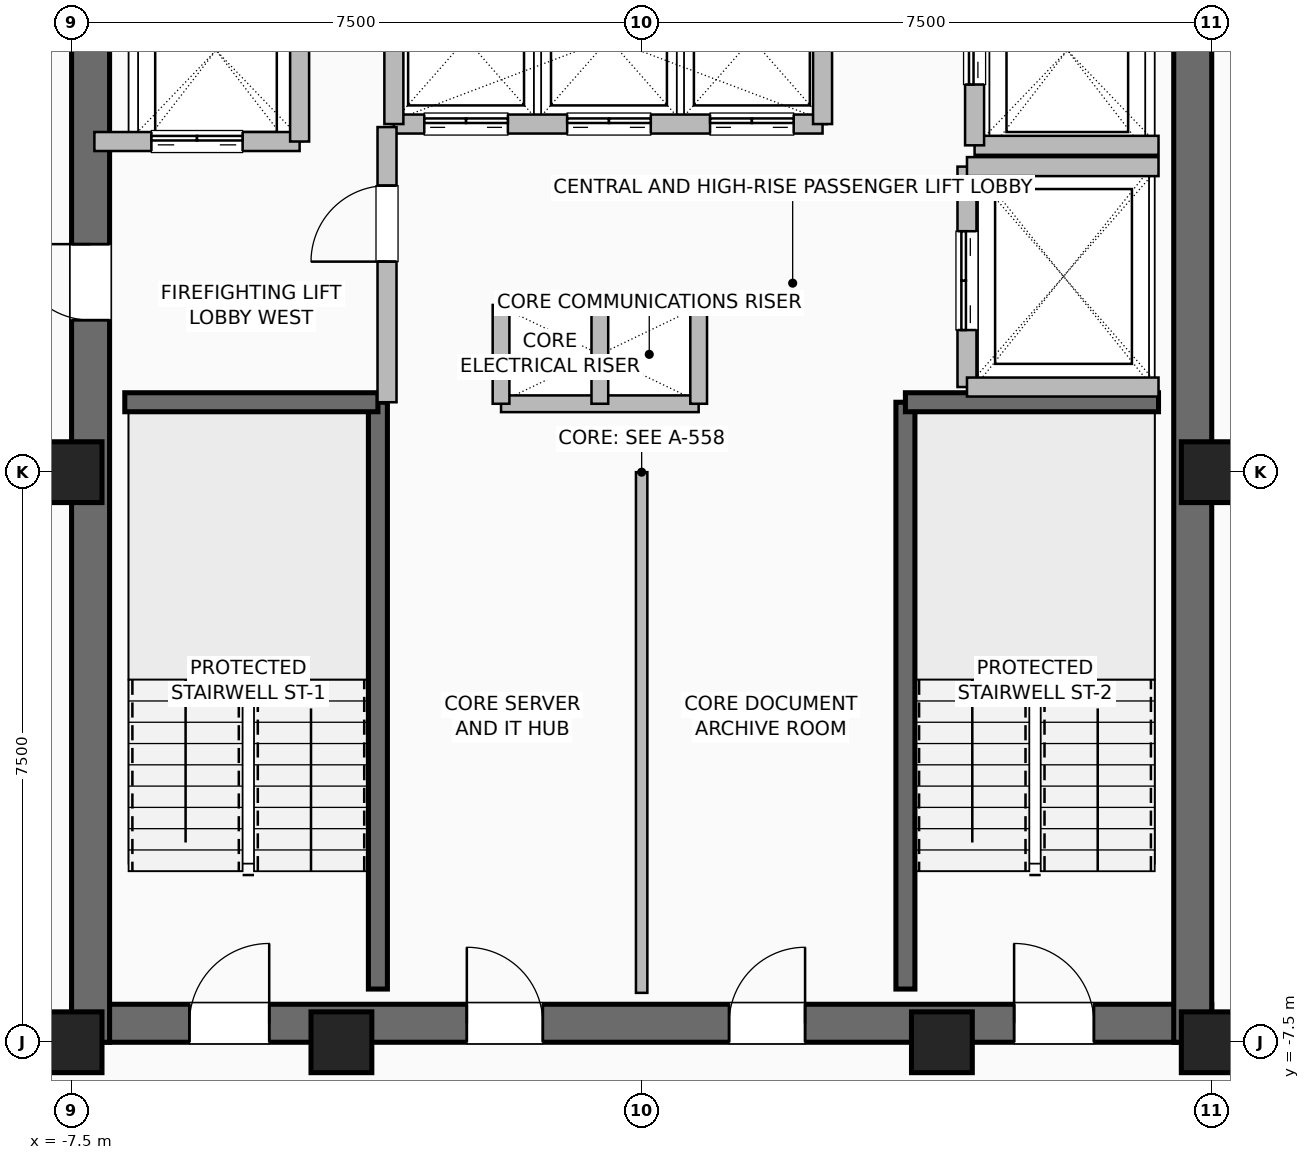
"""IFC4 building model, lengths in metres.
Left out: names, types, materials, properties, quantities, classifications, styles, units other than length and angle.
Written with IfcOpenShell. Run it as: python <this file> out.ifc"""

import sys

from ifc_helpers import new_model, si_unit, direction, frame, frame_2d, origin, origin_2d, place, context, subcontext, project, spatial, rectangle, hollow_rectangle, extrude, element, fill, save


model = new_model("IFC4")
c1 = context("Model", 3, precision=1e-05, world=origin(), true_north=direction((0.0, 1.0)))
c2 = subcontext(c1, "Body", "Model", "MODEL_VIEW")
j1 = project(units=[si_unit("LENGTHUNIT", "METRE"), si_unit("PLANEANGLEUNIT", "RADIAN")], contexts=[c1])
p1 = place(None, origin())
s1 = spatial("IfcSite", under=j1, at=p1, CompositionType="ELEMENT")
p2 = place(p1, origin())
s2 = spatial("IfcBuilding", under=s1, at=p2, CompositionType="ELEMENT")
p3 = place(p2, frame((0.0, 0.0, 232.4)))
s3 = spatial("IfcBuildingStorey", under=s2, at=p3, CompositionType="ELEMENT", Elevation=232.4)
for number, where, z_axis, x_axis in (
    (1, (-7.5, -7.5, 0.0), (0.0, 0.0, 1.0), (1.0, 0.0, 0.0)),
    (2, (-3.95, -7.5, 0.0), (0.0, 0.0, 1.0), (1.0, 0.0, 0.0)),
    (3, (3.95, -7.5, 0.0), (0.0, 0.0, 1.0), (1.0, 0.0, 0.0)),
    (4, (7.5, -7.5, 0.0), (0.0, 0.0, 1.0), (1.0, 0.0, 0.0)),
    (5, (7.5, 0.0, 0.0), (0.0, 0.0, 1.0), (1.0, 0.0, 0.0)),
    (6, (-7.5, 0.0, 0.0), (0.0, 0.0, 1.0), (1.0, 0.0, 0.0)),
):
    element("IfcColumn", number, at=place(p3, frame(where, z_axis=z_axis, x_axis=x_axis)), inside=s3, PredefinedType="COLUMN", context=c2, shape_type="SweptSolid", body=[
        extrude(hollow_rectangle(XDim=0.8, YDim=0.8, WallThickness=0.04, at=origin_2d()), origin(), (0.0, 0.0, 1.0), 3.6),
    ])
p4 = place(p3, frame((-7.5, -7.25, 0.0), z_axis=(0.0, 0.0, 1.0), x_axis=(1.0, 0.0, 0.0)))
e7 = element("IfcWall", 7, at=p4, inside=s3, PredefinedType="SHEAR", context=c2, shape_type="SweptSolid", body=[
    extrude(rectangle(XDim=15.0, YDim=0.5, at=frame_2d((7.5, 0.0))), origin(), (0.0, 0.0, 1.0), 3.36),
])
p5 = place(p4, frame((1.55, 0.0, 0.0)))
e8 = element("IfcOpeningElement", 8, at=p5, cuts=e7, PredefinedType="OPENING", context=c2, shape_type="SweptSolid", body=[
    extrude(rectangle(XDim=1.05, YDim=2.08, at=frame_2d((0.525, 1.04))), frame((0.0, 0.26, 0.0), z_axis=(0.0, -1.0, 0.0), x_axis=(1.0, 0.0, 0.0)), (0.0, 0.0, 1.0), 0.52),
])
p6 = place(p4, frame((12.4, 0.0, 0.0)))
e9 = element("IfcOpeningElement", 9, at=p6, cuts=e7, PredefinedType="OPENING", context=c2, shape_type="SweptSolid", body=[
    extrude(rectangle(XDim=1.05, YDim=2.08, at=frame_2d((0.525, 1.04))), frame((0.0, 0.26, 0.0), z_axis=(0.0, -1.0, 0.0), x_axis=(1.0, 0.0, 0.0)), (0.0, 0.0, 1.0), 0.52),
])
p7 = place(p4, frame((5.2, 0.0, 0.0)))
e10 = element("IfcOpeningElement", 10, at=p7, cuts=e7, PredefinedType="OPENING", context=c2, shape_type="SweptSolid", body=[
    extrude(rectangle(XDim=1.0, YDim=2.08, at=frame_2d((0.5, 1.04))), frame((0.0, 0.26, 0.0), z_axis=(0.0, -1.0, 0.0), x_axis=(1.0, 0.0, 0.0)), (0.0, 0.0, 1.0), 0.52),
])
p8 = place(p4, frame((8.65, 0.0, 0.0)))
e11 = element("IfcOpeningElement", 11, at=p8, cuts=e7, PredefinedType="OPENING", context=c2, shape_type="SweptSolid", body=[
    extrude(rectangle(XDim=1.0, YDim=2.08, at=frame_2d((0.5, 1.04))), frame((0.0, 0.26, 0.0), z_axis=(0.0, -1.0, 0.0), x_axis=(1.0, 0.0, 0.0)), (0.0, 0.0, 1.0), 0.52),
])
p9 = place(p3, frame((-7.25, -7.5, 0.0), z_axis=(0.0, 0.0, 1.0), x_axis=(0.0, 1.0, 0.0)))
e12 = element("IfcWall", 12, at=p9, inside=s3, PredefinedType="SHEAR", context=c2, shape_type="SweptSolid", body=[
    extrude(rectangle(XDim=15.0, YDim=0.5, at=frame_2d((7.5, 0.0))), origin(), (0.0, 0.0, 1.0), 3.36),
])
p10 = place(p9, frame((9.5, 0.0, 0.0)))
e13 = element("IfcOpeningElement", 13, at=p10, cuts=e12, PredefinedType="OPENING", context=c2, shape_type="SweptSolid", body=[
    extrude(rectangle(XDim=1.0, YDim=2.08, at=frame_2d((0.5, 1.04))), frame((0.0, 0.26, 0.0), z_axis=(0.0, -1.0, 0.0), x_axis=(1.0, 0.0, 0.0)), (0.0, 0.0, 1.0), 0.52),
])
p11 = place(p3, frame((7.25, -7.5, 0.0), z_axis=(0.0, 0.0, 1.0), x_axis=(0.0, 1.0, 0.0)))
e14 = element("IfcWall", 14, at=p11, inside=s3, PredefinedType="SHEAR", context=c2, shape_type="SweptSolid", body=[
    extrude(rectangle(XDim=15.0, YDim=0.5, at=frame_2d((7.5, 0.0))), origin(), (0.0, 0.0, 1.0), 3.36),
])
p12 = place(p3, frame((-3.47, -6.8, 0.0), z_axis=(0.0, 0.0, 1.0), x_axis=(0.0, 1.0, 0.0)))
e15 = element("IfcWall", 15, at=p12, inside=s3, PredefinedType="SHEAR", context=c2, shape_type="SweptSolid", body=[
    extrude(rectangle(XDim=7.72, YDim=0.25, at=frame_2d((3.86, 0.0))), origin(), (0.0, 0.0, 1.0), 3.36),
])
p13 = place(p3, frame((-6.8, 0.92, 0.0), z_axis=(0.0, 0.0, 1.0), x_axis=(1.0, 0.0, 0.0)))
e16 = element("IfcWall", 16, at=p13, inside=s3, PredefinedType="SHEAR", context=c2, shape_type="SweptSolid", body=[
    extrude(rectangle(XDim=3.33, YDim=0.25, at=frame_2d((1.665, 0.0))), origin(), (0.0, 0.0, 1.0), 3.36),
])
p14 = place(p3, frame((3.47, -6.8, 0.0), z_axis=(0.0, 0.0, 1.0), x_axis=(0.0, 1.0, 0.0)))
e17 = element("IfcWall", 17, at=p14, inside=s3, PredefinedType="SHEAR", context=c2, shape_type="SweptSolid", body=[
    extrude(rectangle(XDim=7.72, YDim=0.25, at=frame_2d((3.86, 0.0))), origin(), (0.0, 0.0, 1.0), 3.36),
])
p15 = place(p3, frame((3.47, 0.92, 0.0), z_axis=(0.0, 0.0, 1.0), x_axis=(1.0, 0.0, 0.0)))
e18 = element("IfcWall", 18, at=p15, inside=s3, PredefinedType="SHEAR", context=c2, shape_type="SweptSolid", body=[
    extrude(rectangle(XDim=3.33, YDim=0.25, at=frame_2d((1.665, 0.0))), origin(), (0.0, 0.0, 1.0), 3.36),
])
for number, where, z_axis, x_axis in (
    (19, (-1.85, 2.2, 0.0), (0.0, 0.0, 1.0), (1.0, 0.0, 0.0)),
    (20, (-1.85, 0.9, 0.0), (0.0, 0.0, 1.0), (1.0, 0.0, 0.0)),
):
    element("IfcWall", number, at=place(p3, frame(where, z_axis=z_axis, x_axis=x_axis)), inside=s3, PredefinedType="PARTITIONING", context=c2, shape_type="SweptSolid", body=[
        extrude(rectangle(XDim=2.6, YDim=0.22, at=frame_2d((1.3, 0.0))), origin(), (0.0, 0.0, 1.0), 3.36),
    ])
for number, where, z_axis, x_axis in (
    (21, (-0.55, 0.9, 0.0), (0.0, 0.0, 1.0), (0.0, 1.0, 0.0)),
    (22, (0.75, 0.9, 0.0), (0.0, 0.0, 1.0), (0.0, 1.0, 0.0)),
    (23, (-1.85, 0.9, 0.0), (0.0, 0.0, 1.0), (0.0, 1.0, 0.0)),
):
    element("IfcWall", number, at=place(p3, frame(where, z_axis=z_axis, x_axis=x_axis)), inside=s3, PredefinedType="PARTITIONING", context=c2, shape_type="SweptSolid", body=[
        extrude(rectangle(XDim=1.3, YDim=0.22, at=frame_2d((0.65, 0.0))), origin(), (0.0, 0.0, 1.0), 3.36),
    ])
p16 = place(p3, frame((-3.26, 4.58, 0.0), z_axis=(0.0, 0.0, 1.0), x_axis=(1.0, 0.0, 0.0)))
e24 = element("IfcWall", 24, at=p16, inside=s3, PredefinedType="SHEAR", context=c2, shape_type="SweptSolid", body=[
    extrude(rectangle(XDim=5.64, YDim=0.25, at=frame_2d((2.82, 0.0))), origin(), (0.0, 0.0, 1.0), 3.36),
])
p17 = place(p16, frame((0.4, 0.0, 0.0)))
e25 = element("IfcOpeningElement", 25, at=p17, cuts=e24, PredefinedType="OPENING", context=c2, shape_type="SweptSolid", body=[
    extrude(rectangle(XDim=1.1, YDim=2.2, at=frame_2d((0.55, 1.1))), frame((0.0, 0.135, 0.0), z_axis=(0.0, -1.0, 0.0), x_axis=(1.0, 0.0, 0.0)), (0.0, 0.0, 1.0), 0.27),
])
p18 = place(p16, frame((2.28, 0.0, 0.0)))
e26 = element("IfcOpeningElement", 26, at=p18, cuts=e24, PredefinedType="OPENING", context=c2, shape_type="SweptSolid", body=[
    extrude(rectangle(XDim=1.1, YDim=2.2, at=frame_2d((0.55, 1.1))), frame((0.0, 0.135, 0.0), z_axis=(0.0, -1.0, 0.0), x_axis=(1.0, 0.0, 0.0)), (0.0, 0.0, 1.0), 0.27),
])
p19 = place(p16, frame((4.16, 0.0, 0.0)))
e27 = element("IfcOpeningElement", 27, at=p19, cuts=e24, PredefinedType="OPENING", context=c2, shape_type="SweptSolid", body=[
    extrude(rectangle(XDim=1.1, YDim=2.2, at=frame_2d((0.55, 1.1))), frame((0.0, 0.135, 0.0), z_axis=(0.0, -1.0, 0.0), x_axis=(1.0, 0.0, 0.0)), (0.0, 0.0, 1.0), 0.27),
])
for number, where, z_axis, x_axis in (
    (28, (-3.26, 4.58, 0.0), (0.0, 0.0, 1.0), (0.0, 1.0, 0.0)),
    (29, (2.38, 4.58, 0.0), (0.0, 0.0, 1.0), (0.0, 1.0, 0.0)),
):
    element("IfcWall", number, at=place(p3, frame(where, z_axis=z_axis, x_axis=x_axis)), inside=s3, PredefinedType="SHEAR", context=c2, shape_type="SweptSolid", body=[
        extrude(rectangle(XDim=2.22, YDim=0.25, at=frame_2d((1.11, 0.0))), origin(), (0.0, 0.0, 1.0), 3.36),
    ])
p20 = place(p3, frame((-7.2, 4.35, 0.0), z_axis=(0.0, 0.0, 1.0), x_axis=(1.0, 0.0, 0.0)))
e30 = element("IfcWall", 30, at=p20, inside=s3, PredefinedType="SHEAR", context=c2, shape_type="SweptSolid", body=[
    extrude(rectangle(XDim=2.7, YDim=0.25, at=frame_2d((1.35, 0.0))), origin(), (0.0, 0.0, 1.0), 3.36),
])
p21 = place(p20, frame((0.75, 0.0, 0.0)))
e31 = element("IfcOpeningElement", 31, at=p21, cuts=e30, PredefinedType="OPENING", context=c2, shape_type="SweptSolid", body=[
    extrude(rectangle(XDim=1.2, YDim=2.2, at=frame_2d((0.6, 1.1))), frame((0.0, 0.135, 0.0), z_axis=(0.0, -1.0, 0.0), x_axis=(1.0, 0.0, 0.0)), (0.0, 0.0, 1.0), 0.27),
])
p22 = place(p3, frame((-4.5, 4.35, 0.0), z_axis=(0.0, 0.0, 1.0), x_axis=(0.0, 1.0, 0.0)))
e32 = element("IfcWall", 32, at=p22, inside=s3, PredefinedType="SHEAR", context=c2, shape_type="SweptSolid", body=[
    extrude(rectangle(XDim=2.85, YDim=0.25, at=frame_2d((1.425, 0.0))), origin(), (0.0, 0.0, 1.0), 3.36),
])
p23 = place(p3, frame((4.38, 4.3, 0.0), z_axis=(0.0, 0.0, 1.0), x_axis=(1.0, 0.0, 0.0)))
e33 = element("IfcWall", 33, at=p23, inside=s3, PredefinedType="SHEAR", context=c2, shape_type="SweptSolid", body=[
    extrude(rectangle(XDim=2.42, YDim=0.25, at=frame_2d((1.21, 0.0))), origin(), (0.0, 0.0, 1.0), 3.36),
])
p24 = place(p3, frame((4.38, 4.3, 0.0), z_axis=(0.0, 0.0, 1.0), x_axis=(0.0, 1.0, 0.0)))
e34 = element("IfcWall", 34, at=p24, inside=s3, PredefinedType="SHEAR", context=c2, shape_type="SweptSolid", body=[
    extrude(rectangle(XDim=2.5, YDim=0.25, at=frame_2d((1.25, 0.0))), origin(), (0.0, 0.0, 1.0), 3.36),
])
p25 = place(p24, frame((0.8, 0.0, 0.0)))
e35 = element("IfcOpeningElement", 35, at=p25, cuts=e34, PredefinedType="OPENING", context=c2, shape_type="SweptSolid", body=[
    extrude(rectangle(XDim=1.2, YDim=2.2, at=frame_2d((0.6, 1.1))), frame((0.0, 0.135, 0.0), z_axis=(0.0, -1.0, 0.0), x_axis=(1.0, 0.0, 0.0)), (0.0, 0.0, 1.0), 0.27),
])
p26 = place(p3, frame((4.28, 1.12, 0.0), z_axis=(0.0, 0.0, 1.0), x_axis=(0.0, 1.0, 0.0)))
e36 = element("IfcWall", 36, at=p26, inside=s3, PredefinedType="SHEAR", context=c2, shape_type="SweptSolid", body=[
    extrude(rectangle(XDim=2.9, YDim=0.25, at=frame_2d((1.45, 0.0))), origin(), (0.0, 0.0, 1.0), 3.36),
])
p27 = place(p26, frame((0.75, 0.0, 0.0)))
e37 = element("IfcOpeningElement", 37, at=p27, cuts=e36, PredefinedType="OPENING", context=c2, shape_type="SweptSolid", body=[
    extrude(rectangle(XDim=1.3, YDim=2.3, at=frame_2d((0.65, 1.15))), frame((0.0, 0.135, 0.0), z_axis=(0.0, -1.0, 0.0), x_axis=(1.0, 0.0, 0.0)), (0.0, 0.0, 1.0), 0.27),
])
for number, where, z_axis, x_axis in (
    (38, (4.28, 1.12, 0.0), (0.0, 0.0, 1.0), (1.0, 0.0, 0.0)),
    (39, (4.28, 4.02, 0.0), (0.0, 0.0, 1.0), (1.0, 0.0, 0.0)),
):
    element("IfcWall", number, at=place(p3, frame(where, z_axis=z_axis, x_axis=x_axis)), inside=s3, PredefinedType="SHEAR", context=c2, shape_type="SweptSolid", body=[
        extrude(rectangle(XDim=2.52, YDim=0.25, at=frame_2d((1.26, 0.0))), origin(), (0.0, 0.0, 1.0), 3.36),
    ])
p28 = place(p3, frame((-3.35, 0.92, 0.0), z_axis=(0.0, 0.0, 1.0), x_axis=(0.0, 1.0, 0.0)))
e40 = element("IfcWall", 40, at=p28, inside=s3, PredefinedType="SHEAR", context=c2, shape_type="SweptSolid", body=[
    extrude(rectangle(XDim=3.62, YDim=0.25, at=frame_2d((1.81, 0.0))), origin(), (0.0, 0.0, 1.0), 3.36),
])
p29 = place(p28, frame((1.85, 0.0, 0.0)))
e41 = element("IfcOpeningElement", 41, at=p29, cuts=e40, PredefinedType="OPENING", context=c2, shape_type="SweptSolid", body=[
    extrude(rectangle(XDim=1.0, YDim=2.08, at=frame_2d((0.5, 1.04))), frame((0.0, 0.135, 0.0), z_axis=(0.0, -1.0, 0.0), x_axis=(1.0, 0.0, 0.0)), (0.0, 0.0, 1.0), 0.27),
])
p30 = place(p3, frame((0.0, -6.85, 0.0), z_axis=(0.0, 0.0, 1.0), x_axis=(0.0, 1.0, 0.0)))
e42 = element("IfcWall", 42, at=p30, inside=s3, PredefinedType="PARTITIONING", context=c2, shape_type="SweptSolid", body=[
    extrude(rectangle(XDim=6.85, YDim=0.15, at=frame_2d((3.425, 0.0))), origin(), (0.0, 0.0, 1.0), 3.36),
])
p31 = place(p3, frame((7.45, -7.48, 0.0), z_axis=(0.0, 0.0, 1.0), x_axis=(1.0, 0.0, 0.0)))
e43 = element("IfcWall", 43, at=p31, inside=s3, PredefinedType="PARTITIONING", context=c2, shape_type="SweptSolid", body=[
    extrude(rectangle(XDim=0.95, YDim=0.15, at=frame_2d((0.475, 0.0))), origin(), (0.0, 0.0, 1.0), 3.36),
])
p32 = place(p5, origin())
e44 = element("IfcDoor", 44, at=p32, inside=s3, OperationType="SINGLE_SWING_RIGHT", PredefinedType="DOOR", context=c2, shape_type="SweptSolid", body=[
    extrude(rectangle(XDim=1.05, YDim=2.08, at=frame_2d((0.525, 1.04))), frame((0.0, 0.025, 0.0), z_axis=(0.0, -1.0, 0.0), x_axis=(1.0, 0.0, 0.0)), (0.0, 0.0, 1.0), 0.05),
])
fill(e8, e44)
p33 = place(p6, origin())
e45 = element("IfcDoor", 45, at=p33, inside=s3, OperationType="SINGLE_SWING_LEFT", PredefinedType="DOOR", context=c2, shape_type="SweptSolid", body=[
    extrude(rectangle(XDim=1.05, YDim=2.08, at=frame_2d((0.525, 1.04))), frame((0.0, 0.025, 0.0), z_axis=(0.0, -1.0, 0.0), x_axis=(1.0, 0.0, 0.0)), (0.0, 0.0, 1.0), 0.05),
])
fill(e9, e45)
p34 = place(p10, origin())
e46 = element("IfcDoor", 46, at=p34, inside=s3, OperationType="SINGLE_SWING_RIGHT", PredefinedType="DOOR", context=c2, shape_type="SweptSolid", body=[
    extrude(rectangle(XDim=1.0, YDim=2.08, at=frame_2d((0.5, 1.04))), frame((0.0, 0.025, 0.0), z_axis=(0.0, -1.0, 0.0), x_axis=(1.0, 0.0, 0.0)), (0.0, 0.0, 1.0), 0.05),
])
fill(e13, e46)
p35 = place(p7, origin())
e47 = element("IfcDoor", 47, at=p35, inside=s3, OperationType="SINGLE_SWING_LEFT", PredefinedType="DOOR", context=c2, shape_type="SweptSolid", body=[
    extrude(rectangle(XDim=1.0, YDim=2.08, at=frame_2d((0.5, 1.04))), frame((0.0, 0.025, 0.0), z_axis=(0.0, -1.0, 0.0), x_axis=(1.0, 0.0, 0.0)), (0.0, 0.0, 1.0), 0.05),
])
fill(e10, e47)
p36 = place(p8, origin())
e48 = element("IfcDoor", 48, at=p36, inside=s3, OperationType="SINGLE_SWING_RIGHT", PredefinedType="DOOR", context=c2, shape_type="SweptSolid", body=[
    extrude(rectangle(XDim=1.0, YDim=2.08, at=frame_2d((0.5, 1.04))), frame((0.0, 0.025, 0.0), z_axis=(0.0, -1.0, 0.0), x_axis=(1.0, 0.0, 0.0)), (0.0, 0.0, 1.0), 0.05),
])
fill(e11, e48)
p37 = place(p17, origin())
e49 = element("IfcDoor", 49, at=p37, inside=s3, OperationType="DOUBLE_DOOR_SLIDING", PredefinedType="DOOR", context=c2, shape_type="SweptSolid", body=[
    extrude(rectangle(XDim=1.1, YDim=2.2, at=frame_2d((0.55, 1.1))), frame((0.0, 0.025, 0.0), z_axis=(0.0, -1.0, 0.0), x_axis=(1.0, 0.0, 0.0)), (0.0, 0.0, 1.0), 0.05),
])
fill(e25, e49)
p38 = place(p18, origin())
e50 = element("IfcDoor", 50, at=p38, inside=s3, OperationType="DOUBLE_DOOR_SLIDING", PredefinedType="DOOR", context=c2, shape_type="SweptSolid", body=[
    extrude(rectangle(XDim=1.1, YDim=2.2, at=frame_2d((0.55, 1.1))), frame((0.0, 0.025, 0.0), z_axis=(0.0, -1.0, 0.0), x_axis=(1.0, 0.0, 0.0)), (0.0, 0.0, 1.0), 0.05),
])
fill(e26, e50)
p39 = place(p19, origin())
e51 = element("IfcDoor", 51, at=p39, inside=s3, OperationType="DOUBLE_DOOR_SLIDING", PredefinedType="DOOR", context=c2, shape_type="SweptSolid", body=[
    extrude(rectangle(XDim=1.1, YDim=2.2, at=frame_2d((0.55, 1.1))), frame((0.0, 0.025, 0.0), z_axis=(0.0, -1.0, 0.0), x_axis=(1.0, 0.0, 0.0)), (0.0, 0.0, 1.0), 0.05),
])
fill(e27, e51)
p40 = place(p21, origin())
e52 = element("IfcDoor", 52, at=p40, inside=s3, OperationType="DOUBLE_DOOR_SLIDING", PredefinedType="DOOR", context=c2, shape_type="SweptSolid", body=[
    extrude(rectangle(XDim=1.2, YDim=2.2, at=frame_2d((0.6, 1.1))), frame((0.0, 0.025, 0.0), z_axis=(0.0, -1.0, 0.0), x_axis=(1.0, 0.0, 0.0)), (0.0, 0.0, 1.0), 0.05),
])
fill(e31, e52)
p41 = place(p25, origin())
e53 = element("IfcDoor", 53, at=p41, inside=s3, OperationType="DOUBLE_DOOR_SLIDING", PredefinedType="DOOR", context=c2, shape_type="SweptSolid", body=[
    extrude(rectangle(XDim=1.2, YDim=2.2, at=frame_2d((0.6, 1.1))), frame((0.0, 0.025, 0.0), z_axis=(0.0, -1.0, 0.0), x_axis=(1.0, 0.0, 0.0)), (0.0, 0.0, 1.0), 0.05),
])
fill(e35, e53)
p42 = place(p27, origin())
e54 = element("IfcDoor", 54, at=p42, inside=s3, OperationType="DOUBLE_DOOR_SLIDING", PredefinedType="DOOR", context=c2, shape_type="SweptSolid", body=[
    extrude(rectangle(XDim=1.3, YDim=2.3, at=frame_2d((0.65, 1.15))), frame((0.0, 0.025, 0.0), z_axis=(0.0, -1.0, 0.0), x_axis=(1.0, 0.0, 0.0)), (0.0, 0.0, 1.0), 0.05),
])
fill(e37, e54)
p43 = place(p29, origin())
e55 = element("IfcDoor", 55, at=p43, inside=s3, OperationType="SINGLE_SWING_LEFT", PredefinedType="DOOR", context=c2, shape_type="SweptSolid", body=[
    extrude(rectangle(XDim=1.0, YDim=2.08, at=frame_2d((0.5, 1.04))), frame((0.0, 0.025, 0.0), z_axis=(0.0, -1.0, 0.0), x_axis=(1.0, 0.0, 0.0)), (0.0, 0.0, 1.0), 0.05),
])
fill(e41, e55)
save(model, sys.argv[1])
